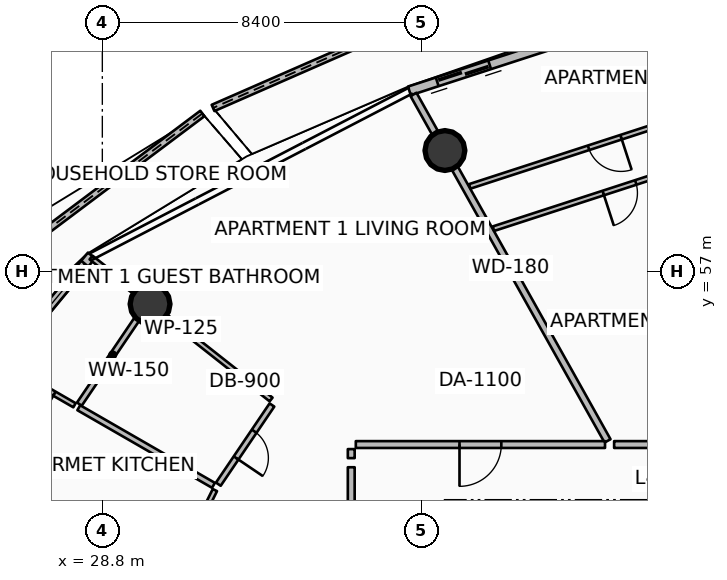
"""IFC4 building model, lengths in metres.
Left out: names, types, materials, properties, quantities, classifications, styles, units other than length and angle.
Written with IfcOpenShell. Run it as: python <this file> out.ifc"""

import sys

from ifc_helpers import new_model, si_unit, direction, frame, frame_2d, origin, origin_2d, place, context, subcontext, project, spatial, polyline, rectangle, circle, outline, extrude, element, fill, save


model = new_model("IFC4")
c1 = context("Model", 3, precision=1e-05, world=origin(), true_north=direction((0.0, 1.0)))
c2 = subcontext(c1, "Body", "Model", "MODEL_VIEW")
j1 = project(units=[si_unit("LENGTHUNIT", "METRE"), si_unit("PLANEANGLEUNIT", "RADIAN")], contexts=[c1])
p1 = place(None, origin())
s1 = spatial("IfcSite", under=j1, at=p1, CompositionType="ELEMENT")
p2 = place(p1, origin())
s2 = spatial("IfcBuilding", under=s1, at=p2, CompositionType="ELEMENT")
p3 = place(p2, frame((0.0, 0.0, 191.55)))
s3 = spatial("IfcBuildingStorey", under=s2, at=p3, CompositionType="ELEMENT", Elevation=191.55)
for number, where, z_axis, x_axis in (
    (1, (37.815, 60.186, 0.0), (0.0, 0.0, 1.0), (1.0, 0.0, 0.0)),
    (2, (30.056, 56.146, 0.0), (0.0, 0.0, 1.0), (1.0, 0.0, 0.0)),
):
    element("IfcColumn", number, at=place(p3, frame(where, z_axis=z_axis, x_axis=x_axis)), inside=s3, PredefinedType="COLUMN", context=c2, shape_type="SweptSolid", body=[
        extrude(circle(Radius=0.525, at=origin_2d()), origin(), (0.0, 0.0, 1.0), 3.5),
    ])
p4 = place(p3, frame((40.37, 65.097, 0.0), z_axis=(0.0, 0.0, 1.0), x_axis=(-0.916057097562, -0.401047869968, 0.0)))
e3 = element("IfcWall", 3, at=p4, inside=s3, PredefinedType="PARAPET", context=c2, shape_type="SweptSolid", body=[
    extrude(outline(polyline([(0.0, 0.0), (9.45, 0.0), (9.45, 1.12), (4.725, 1.182), (0.0, 1.348), (0.0, 0.0)])), frame((0.0, 0.09, 0.0), z_axis=(0.0, -1.0, 0.0), x_axis=(1.0, 0.0, 0.0)), (0.0, 0.0, 1.0), 0.18),
])
p5 = place(p3, frame((31.432, 61.16, 0.0), z_axis=(0.0, 0.0, 1.0), x_axis=(-0.799768695593, -0.600308282093, 0.0)))
e4 = element("IfcWall", 4, at=p5, inside=s3, PredefinedType="PARAPET", context=c2, shape_type="SweptSolid", body=[
    extrude(outline(polyline([(0.0, 0.0), (10.515, 0.0), (10.515, 1.348), (5.258, 1.182), (0.0, 1.12), (0.0, 0.0)])), frame((0.0, 0.09, 0.0), z_axis=(0.0, -1.0, 0.0), x_axis=(1.0, 0.0, 0.0)), (0.0, 0.0, 1.0), 0.18),
])
p6 = place(p3, frame((45.384, 64.519, 0.0), z_axis=(0.0, 0.0, 1.0), x_axis=(-0.951058543936, -0.309010753869, 0.0)))
e5 = element("IfcWall", 5, at=p6, inside=s3, PredefinedType="SOLIDWALL", context=c2, shape_type="SweptSolid", body=[
    extrude(rectangle(XDim=8.942, YDim=0.24, at=frame_2d((4.471, 0.0))), origin(), (0.0, 0.0, 1.0), 2.45),
])
p7 = place(p6, frame((6.722, 0.0, 0.0)))
e6 = element("IfcOpeningElement", 6, at=p7, cuts=e5, PredefinedType="OPENING", context=c2, shape_type="SweptSolid", body=[
    extrude(rectangle(XDim=1.45, YDim=2.15, at=frame_2d((0.725, 1.075))), frame((0.0, 0.13, 0.0), z_axis=(0.0, -1.0, 0.0), x_axis=(1.0, 0.0, 0.0)), (0.0, 0.0, 1.0), 0.26),
])
p8 = place(p6, frame((0.28, 0.0, 0.65)))
e7 = element("IfcOpeningElement", 7, at=p8, cuts=e5, PredefinedType="OPENING", context=c2, shape_type="SweptSolid", body=[
    extrude(rectangle(XDim=1.6, YDim=1.5, at=frame_2d((0.8, 0.75))), frame((0.0, 0.13, 0.0), z_axis=(0.0, -1.0, 0.0), x_axis=(1.0, 0.0, 0.0)), (0.0, 0.0, 1.0), 0.26),
])
p9 = place(p3, frame((28.515, 57.424, 0.0), z_axis=(0.0, 0.0, 1.0), x_axis=(-0.636759394418, -0.771062561418, 0.0)))
e8 = element("IfcWall", 8, at=p9, inside=s3, PredefinedType="SOLIDWALL", context=c2, shape_type="SweptSolid", body=[
    extrude(rectangle(XDim=10.494, YDim=0.24, at=frame_2d((5.247, 0.0))), origin(), (0.0, 0.0, 1.0), 2.45),
])
p10 = place(p9, frame((8.274, 0.0, 0.0)))
e9 = element("IfcOpeningElement", 9, at=p10, cuts=e8, PredefinedType="OPENING", context=c2, shape_type="SweptSolid", body=[
    extrude(rectangle(XDim=1.45, YDim=2.15, at=frame_2d((0.725, 1.075))), frame((0.0, 0.13, 0.0), z_axis=(0.0, -1.0, 0.0), x_axis=(1.0, 0.0, 0.0)), (0.0, 0.0, 1.0), 0.26),
])
p11 = place(p9, frame((0.28, 0.0, 0.65)))
e10 = element("IfcOpeningElement", 10, at=p11, cuts=e8, PredefinedType="OPENING", context=c2, shape_type="SweptSolid", body=[
    extrude(rectangle(XDim=1.6, YDim=1.5, at=frame_2d((0.8, 0.75))), frame((0.0, 0.13, 0.0), z_axis=(0.0, -1.0, 0.0), x_axis=(1.0, 0.0, 0.0)), (0.0, 0.0, 1.0), 0.26),
])
p12 = place(p3, frame((42.094, 52.546, 0.0), z_axis=(0.0, 0.0, 1.0), x_axis=(-0.488614041717, 0.872500039104, 0.0)))
e11 = element("IfcWall", 11, at=p12, inside=s3, PredefinedType="PARTITIONING", context=c2, shape_type="SweptSolid", body=[
    extrude(rectangle(XDim=10.448, YDim=0.18, at=frame_2d((5.224, 0.0))), origin(), (0.0, 0.0, 1.0), 2.94),
])
p13 = place(p3, frame((42.028, 52.45, 0.0), z_axis=(0.0, 0.0, 1.0), x_axis=(-1.0, 0.0, 0.0)))
e12 = element("IfcWall", 12, at=p13, inside=s3, PredefinedType="PARTITIONING", context=c2, shape_type="SweptSolid", body=[
    extrude(rectangle(XDim=6.558, YDim=0.18, at=frame_2d((3.279, 0.0))), origin(), (0.0, 0.0, 1.0), 2.94),
])
p14 = place(p13, frame((2.729, 0.0, 0.0)))
e13 = element("IfcOpeningElement", 13, at=p14, cuts=e12, PredefinedType="OPENING", context=c2, shape_type="SweptSolid", body=[
    extrude(rectangle(XDim=1.1, YDim=2.1, at=frame_2d((0.55, 1.05))), frame((0.0, 0.1, 0.0), z_axis=(0.0, -1.0, 0.0), x_axis=(1.0, 0.0, 0.0)), (0.0, 0.0, 1.0), 0.2),
])
p15 = place(p3, frame((35.35, 52.33, 0.0), z_axis=(0.0, 0.0, 1.0), x_axis=(0.0, -1.0, 0.0)))
e14 = element("IfcWall", 14, at=p15, inside=s3, PredefinedType="PARTITIONING", context=c2, shape_type="SweptSolid", body=[
    extrude(rectangle(XDim=0.238, YDim=0.18, at=frame_2d((0.119, 0.0))), origin(), (0.0, 0.0, 1.0), 2.94),
])
p16 = place(p3, frame((35.35, 51.853, 0.0), z_axis=(0.0, 0.0, 1.0), x_axis=(0.0, -1.0, 0.0)))
e15 = element("IfcWall", 15, at=p16, inside=s3, PredefinedType="PARTITIONING", context=c2, shape_type="SweptSolid", body=[
    extrude(rectangle(XDim=6.165, YDim=0.18, at=frame_2d((3.083, 0.0))), origin(), (0.0, 0.0, 1.0), 2.94),
])
p17 = place(p3, frame((33.241, 53.635, 0.0), z_axis=(0.0, 0.0, 1.0), x_axis=(-0.785321754625, 0.619087830371, 0.0)))
e16 = element("IfcWall", 16, at=p17, inside=s3, PredefinedType="PARTITIONING", context=c2, shape_type="SweptSolid", body=[
    extrude(rectangle(XDim=6.033, YDim=0.125, at=frame_2d((3.017, 0.0))), origin(), (0.0, 0.0, 1.0), 2.94),
])
p18 = place(p3, frame((33.263, 53.49, 0.0), z_axis=(0.0, 0.0, 1.0), x_axis=(-0.560597119889, -0.828088684364, 0.0)))
e17 = element("IfcWall", 17, at=p18, inside=s3, PredefinedType="PARTITIONING", context=c2, shape_type="SweptSolid", body=[
    extrude(rectangle(XDim=2.516, YDim=0.15, at=frame_2d((1.258, 0.0))), origin(), (0.0, 0.0, 1.0), 2.94),
])
p19 = place(p18, frame((0.833, 0.0, 0.0)))
e18 = element("IfcOpeningElement", 18, at=p19, cuts=e17, PredefinedType="OPENING", context=c2, shape_type="SweptSolid", body=[
    extrude(rectangle(XDim=0.85, YDim=2.06, at=frame_2d((0.425, 1.03))), frame((0.0, 0.085, 0.0), z_axis=(0.0, -1.0, 0.0), x_axis=(1.0, 0.0, 0.0)), (0.0, 0.0, 1.0), 0.17),
])
p20 = place(p3, frame((29.949, 56.103, 0.0), z_axis=(0.0, 0.0, 1.0), x_axis=(-0.560630647655, -0.828065985843, 0.0)))
e19 = element("IfcWall", 19, at=p20, inside=s3, PredefinedType="PARTITIONING", context=c2, shape_type="SweptSolid", body=[
    extrude(rectangle(XDim=3.128, YDim=0.15, at=frame_2d((1.564, 0.0))), origin(), (0.0, 0.0, 1.0), 2.94),
])
p21 = place(p3, frame((31.724, 51.377, 0.0), z_axis=(0.0, 0.0, 1.0), x_axis=(-0.866511364258, 0.499157345545, 0.0)))
e20 = element("IfcWall", 20, at=p21, inside=s3, PredefinedType="PARTITIONING", context=c2, shape_type="SweptSolid", body=[
    extrude(rectangle(XDim=4.09, YDim=0.15, at=frame_2d((2.045, 0.0))), origin(), (0.0, 0.0, 1.0), 2.94),
])
p22 = place(p3, frame((28.067, 53.484, 0.0), z_axis=(0.0, 0.0, 1.0), x_axis=(-0.866444666734, 0.49927311112, 0.0)))
e21 = element("IfcWall", 21, at=p22, inside=s3, PredefinedType="PARTITIONING", context=c2, shape_type="SweptSolid", body=[
    extrude(rectangle(XDim=2.07, YDim=0.125, at=frame_2d((1.035, 0.0))), origin(), (0.0, 0.0, 1.0), 2.94),
])
p23 = place(p22, frame((0.61, 0.0, 0.0)))
e22 = element("IfcOpeningElement", 22, at=p23, cuts=e21, PredefinedType="OPENING", context=c2, shape_type="SweptSolid", body=[
    extrude(rectangle(XDim=0.85, YDim=2.06, at=frame_2d((0.425, 1.03))), frame((0.0, 0.073, 0.0), z_axis=(0.0, -1.0, 0.0), x_axis=(1.0, 0.0, 0.0)), (0.0, 0.0, 1.0), 0.145),
])
p24 = place(p3, frame((30.69, 49.294, 0.0), z_axis=(0.0, 0.0, 1.0), x_axis=(-0.921527492378, 0.388313122095, 0.0)))
e23 = element("IfcWall", 23, at=p24, inside=s3, PredefinedType="PARTITIONING", context=c2, shape_type="SweptSolid", body=[
    extrude(rectangle(XDim=7.031, YDim=0.125, at=frame_2d((3.516, 0.0))), origin(), (0.0, 0.0, 1.0), 2.94),
])
p25 = place(p3, frame((31.762, 51.252, 0.0), z_axis=(0.0, 0.0, 1.0), x_axis=(-0.444525075821, -0.89576640759, 0.0)))
e24 = element("IfcWall", 24, at=p25, inside=s3, PredefinedType="PARTITIONING", context=c2, shape_type="SweptSolid", body=[
    extrude(rectangle(XDim=2.145, YDim=0.125, at=frame_2d((1.072, 0.0))), origin(), (0.0, 0.0, 1.0), 2.94),
])
p26 = place(p25, frame((0.647, 0.0, 0.0)))
e25 = element("IfcOpeningElement", 25, at=p26, cuts=e24, PredefinedType="OPENING", context=c2, shape_type="SweptSolid", body=[
    extrude(rectangle(XDim=0.85, YDim=2.06, at=frame_2d((0.425, 1.03))), frame((0.0, 0.073, 0.0), z_axis=(0.0, -1.0, 0.0), x_axis=(1.0, 0.0, 0.0)), (0.0, 0.0, 1.0), 0.145),
])
p27 = place(p3, frame((46.643, 52.45, 0.0), z_axis=(0.0, 0.0, 1.0), x_axis=(-1.0, 0.0, 0.0)))
e26 = element("IfcWall", 26, at=p27, inside=s3, PredefinedType="PARTITIONING", context=c2, shape_type="SweptSolid", body=[
    extrude(rectangle(XDim=4.376, YDim=0.18, at=frame_2d((2.188, 0.0))), origin(), (0.0, 0.0, 1.0), 2.94),
])
p28 = place(p3, frame((45.727, 60.285, 0.0), z_axis=(0.0, 0.0, 1.0), x_axis=(-0.951056178842, -0.309018032946, 0.0)))
e27 = element("IfcWall", 27, at=p28, inside=s3, PredefinedType="PARTITIONING", context=c2, shape_type="SweptSolid", body=[
    extrude(rectangle(XDim=6.978, YDim=0.125, at=frame_2d((3.489, 0.0))), origin(), (0.0, 0.0, 1.0), 2.94),
])
p29 = place(p28, frame((3.039, 0.0, 0.0)))
e28 = element("IfcOpeningElement", 28, at=p29, cuts=e27, PredefinedType="OPENING", context=c2, shape_type="SweptSolid", body=[
    extrude(rectangle(XDim=0.9, YDim=2.08, at=frame_2d((0.45, 1.04))), frame((0.0, 0.073, 0.0), z_axis=(0.0, -1.0, 0.0), x_axis=(1.0, 0.0, 0.0)), (0.0, 0.0, 1.0), 0.145),
])
p30 = place(p3, frame((45.577, 61.552, 0.0), z_axis=(0.0, 0.0, 1.0), x_axis=(-0.95105638647, -0.309017393935, 0.0)))
e29 = element("IfcWall", 29, at=p30, inside=s3, PredefinedType="PARTITIONING", context=c2, shape_type="SweptSolid", body=[
    extrude(rectangle(XDim=7.476, YDim=0.125, at=frame_2d((3.738, 0.0))), origin(), (0.0, 0.0, 1.0), 2.94),
])
p31 = place(p30, frame((3.288, 0.0, 0.0)))
e30 = element("IfcOpeningElement", 30, at=p31, cuts=e29, PredefinedType="OPENING", context=c2, shape_type="SweptSolid", body=[
    extrude(rectangle(XDim=0.9, YDim=2.08, at=frame_2d((0.45, 1.04))), frame((0.0, 0.073, 0.0), z_axis=(0.0, -1.0, 0.0), x_axis=(1.0, 0.0, 0.0)), (0.0, 0.0, 1.0), 0.145),
])
p32 = place(p7, origin())
e31 = element("IfcDoor", 31, at=p32, inside=s3, OperationType="DOUBLE_DOOR_SLIDING", PredefinedType="DOOR", context=c2, shape_type="SweptSolid", body=[
    extrude(rectangle(XDim=1.45, YDim=2.15, at=frame_2d((0.725, 1.075))), frame((0.0, 0.025, 0.0), z_axis=(0.0, -1.0, 0.0), x_axis=(1.0, 0.0, 0.0)), (0.0, 0.0, 1.0), 0.05),
])
fill(e6, e31)
p33 = place(p11, origin())
e32 = element("IfcWindow", 32, at=p33, inside=s3, PartitioningType="SINGLE_PANEL", PredefinedType="WINDOW", context=c2, shape_type="SweptSolid", body=[
    extrude(rectangle(XDim=1.6, YDim=1.5, at=frame_2d((0.8, 0.75))), frame((0.0, 0.03, 0.0), z_axis=(0.0, -1.0, 0.0), x_axis=(1.0, 0.0, 0.0)), (0.0, 0.0, 1.0), 0.06),
])
fill(e10, e32)
p34 = place(p14, origin())
e33 = element("IfcDoor", 33, at=p34, inside=s3, OperationType="SINGLE_SWING_RIGHT", PredefinedType="DOOR", context=c2, shape_type="SweptSolid", body=[
    extrude(rectangle(XDim=1.1, YDim=2.1, at=frame_2d((0.55, 1.05))), frame((0.0, 0.025, 0.0), z_axis=(0.0, -1.0, 0.0), x_axis=(1.0, 0.0, 0.0)), (0.0, 0.0, 1.0), 0.05),
])
fill(e13, e33)
p35 = place(p19, origin())
e34 = element("IfcDoor", 34, at=p35, inside=s3, OperationType="SINGLE_SWING_RIGHT", PredefinedType="DOOR", context=c2, shape_type="SweptSolid", body=[
    extrude(rectangle(XDim=0.85, YDim=2.06, at=frame_2d((0.425, 1.03))), frame((0.0, 0.025, 0.0), z_axis=(0.0, -1.0, 0.0), x_axis=(1.0, 0.0, 0.0)), (0.0, 0.0, 1.0), 0.05),
])
fill(e18, e34)
p36 = place(p23, origin())
e35 = element("IfcDoor", 35, at=p36, inside=s3, OperationType="SINGLE_SWING_LEFT", PredefinedType="DOOR", context=c2, shape_type="SweptSolid", body=[
    extrude(rectangle(XDim=0.85, YDim=2.06, at=frame_2d((0.425, 1.03))), frame((0.0, 0.025, 0.0), z_axis=(0.0, -1.0, 0.0), x_axis=(1.0, 0.0, 0.0)), (0.0, 0.0, 1.0), 0.05),
])
fill(e22, e35)
p37 = place(p29, origin())
e36 = element("IfcDoor", 36, at=p37, inside=s3, OperationType="SINGLE_SWING_RIGHT", PredefinedType="DOOR", context=c2, shape_type="SweptSolid", body=[
    extrude(rectangle(XDim=0.9, YDim=2.08, at=frame_2d((0.45, 1.04))), frame((0.0, 0.025, 0.0), z_axis=(0.0, -1.0, 0.0), x_axis=(1.0, 0.0, 0.0)), (0.0, 0.0, 1.0), 0.05),
])
fill(e28, e36)
p38 = place(p31, origin())
e37 = element("IfcDoor", 37, at=p38, inside=s3, OperationType="SINGLE_SWING_LEFT", PredefinedType="DOOR", context=c2, shape_type="SweptSolid", body=[
    extrude(rectangle(XDim=0.9, YDim=2.08, at=frame_2d((0.45, 1.04))), frame((0.0, 0.025, 0.0), z_axis=(0.0, -1.0, 0.0), x_axis=(1.0, 0.0, 0.0)), (0.0, 0.0, 1.0), 0.05),
])
fill(e30, e37)
save(model, sys.argv[1])
